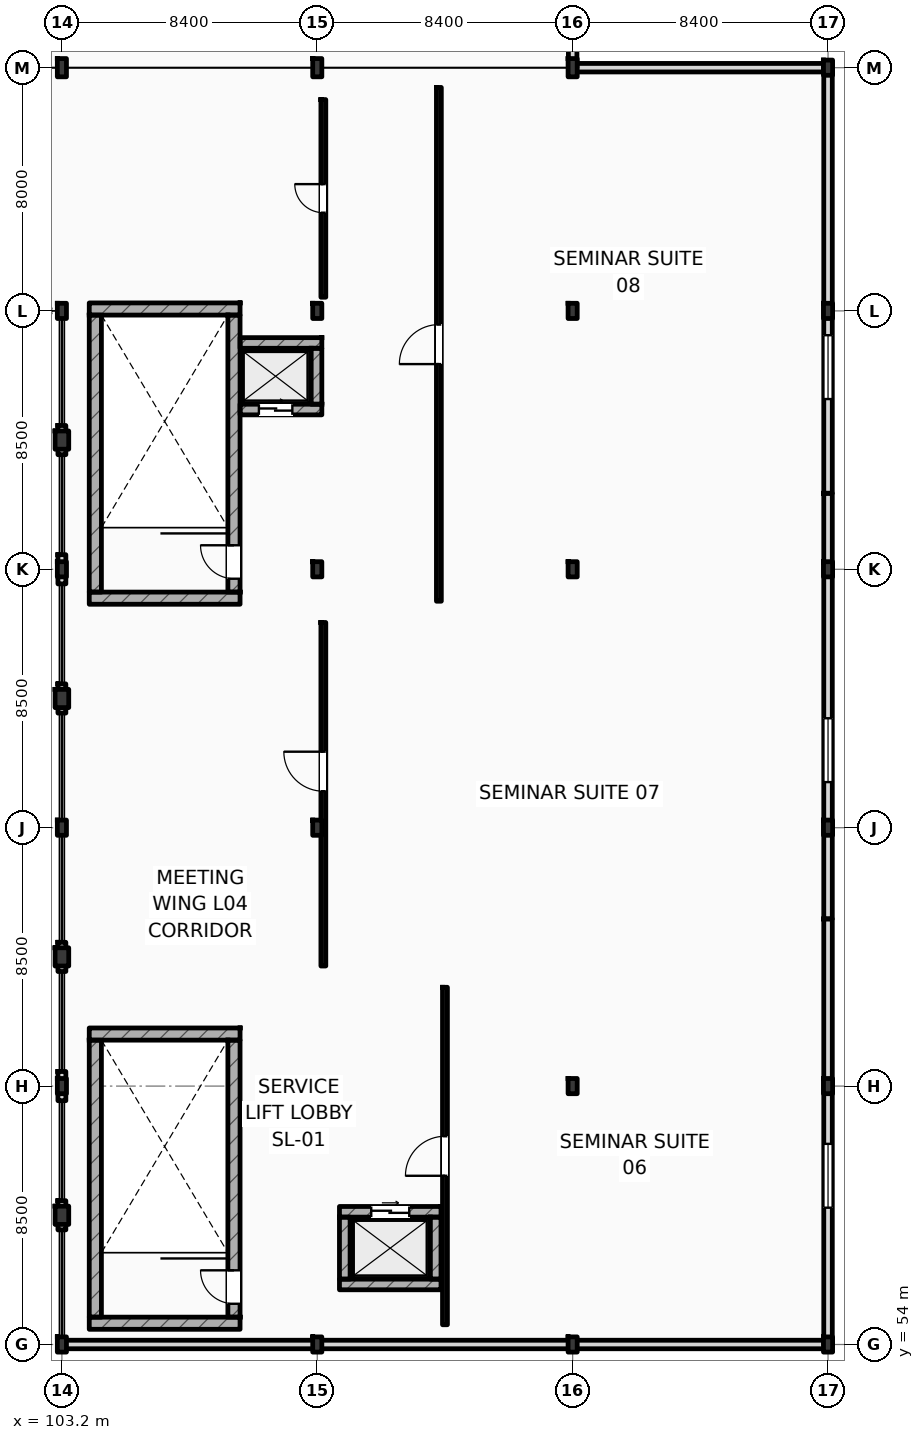
"""IFC4 building model, lengths in metres.
Left out: names, types, materials, properties, quantities, classifications, styles, units other than length and angle.
Written with IfcOpenShell. Run it as: python <this file> out.ifc"""

import sys

from ifc_helpers import new_model, si_unit, direction, frame, frame_2d, origin, origin_2d, place, context, subcontext, project, spatial, rectangle, i_section, extrude, element, fill, save


model = new_model("IFC4")
c1 = context("Model", 3, precision=1e-05, world=origin(), true_north=direction((0.0, 1.0)))
c2 = subcontext(c1, "Body", "Model", "MODEL_VIEW")
j1 = project(units=[si_unit("LENGTHUNIT", "METRE"), si_unit("PLANEANGLEUNIT", "RADIAN")], contexts=[c1])
p1 = place(None, origin())
s1 = spatial("IfcSite", under=j1, at=p1, CompositionType="ELEMENT")
p2 = place(p1, origin())
s2 = spatial("IfcBuilding", under=s1, at=p2, CompositionType="ELEMENT")
p3 = place(p2, frame((0.0, 0.0, 20.4)))
s3 = spatial("IfcBuildingStorey", under=s2, at=p3, CompositionType="ELEMENT", Elevation=20.4)
for number, where, z_axis, x_axis in (
    (1, (103.2, 96.0, 0.0), (0.0, 0.0, 1.0), (1.0, 0.0, 0.0)),
    (2, (111.6, 96.0, 0.0), (0.0, 0.0, 1.0), (1.0, 0.0, 0.0)),
    (3, (120.0, 96.0, 0.0), (0.0, 0.0, 1.0), (1.0, 0.0, 0.0)),
):
    element("IfcColumn", number, at=place(p3, frame(where, z_axis=z_axis, x_axis=x_axis)), inside=s3, PredefinedType="COLUMN", context=c2, shape_type="SweptSolid", body=[
        extrude(i_section(OverallWidth=0.3, OverallDepth=0.6, WebThickness=0.015, FlangeThickness=0.03, FilletRadius=0.027, at=origin_2d()), origin(), (0.0, 0.0, 1.0), 4.2),
    ])
for number, where, z_axis, x_axis in (
    (4, (103.2, 88.0, 0.0), (0.0, 0.0, 1.0), (1.0, 0.0, 0.0)),
    (5, (103.2, 54.0, 0.0), (0.0, 0.0, 1.0), (1.0, 0.0, 0.0)),
    (6, (103.2, 62.5, 0.0), (0.0, 0.0, 1.0), (1.0, 0.0, 0.0)),
    (7, (103.2, 71.0, 0.0), (0.0, 0.0, 1.0), (1.0, 0.0, 0.0)),
    (8, (103.2, 79.5, 0.0), (0.0, 0.0, 1.0), (1.0, 0.0, 0.0)),
    (9, (111.6, 54.0, 0.0), (0.0, 0.0, 1.0), (1.0, 0.0, 0.0)),
    (10, (111.6, 62.5, 0.0), (0.0, 0.0, 1.0), (1.0, 0.0, 0.0)),
    (11, (111.6, 71.0, 0.0), (0.0, 0.0, 1.0), (1.0, 0.0, 0.0)),
    (12, (111.6, 79.5, 0.0), (0.0, 0.0, 1.0), (1.0, 0.0, 0.0)),
    (13, (111.6, 88.0, 0.0), (0.0, 0.0, 1.0), (1.0, 0.0, 0.0)),
    (14, (120.0, 54.0, 0.0), (0.0, 0.0, 1.0), (1.0, 0.0, 0.0)),
    (15, (120.0, 62.5, 0.0), (0.0, 0.0, 1.0), (1.0, 0.0, 0.0)),
    (16, (120.0, 79.5, 0.0), (0.0, 0.0, 1.0), (1.0, 0.0, 0.0)),
    (17, (120.0, 88.0, 0.0), (0.0, 0.0, 1.0), (1.0, 0.0, 0.0)),
    (18, (128.4, 54.0, 0.0), (0.0, 0.0, 1.0), (1.0, 0.0, 0.0)),
    (19, (128.4, 62.5, 0.0), (0.0, 0.0, 1.0), (1.0, 0.0, 0.0)),
    (20, (128.4, 71.0, 0.0), (0.0, 0.0, 1.0), (1.0, 0.0, 0.0)),
    (21, (128.4, 79.5, 0.0), (0.0, 0.0, 1.0), (1.0, 0.0, 0.0)),
    (22, (128.4, 88.0, 0.0), (0.0, 0.0, 1.0), (1.0, 0.0, 0.0)),
    (23, (128.4, 96.0, 0.0), (0.0, 0.0, 1.0), (1.0, 0.0, 0.0)),
):
    element("IfcColumn", number, at=place(p3, frame(where, z_axis=z_axis, x_axis=x_axis)), inside=s3, PredefinedType="COLUMN", context=c2, shape_type="SweptSolid", body=[
        extrude(i_section(OverallWidth=0.3, OverallDepth=0.5, WebThickness=0.014, FlangeThickness=0.028, FilletRadius=0.027, at=origin_2d()), origin(), (0.0, 0.0, 1.0), 4.2),
    ])
for number, where, z_axis, x_axis in (
    (24, (103.2, 58.25, 0.0), (0.0, 0.0, 1.0), (1.0, 0.0, 0.0)),
    (25, (103.2, 66.75, 0.0), (0.0, 0.0, 1.0), (1.0, 0.0, 0.0)),
    (26, (103.2, 75.25, 0.0), (0.0, 0.0, 1.0), (1.0, 0.0, 0.0)),
    (27, (103.2, 83.75, 0.0), (0.0, 0.0, 1.0), (1.0, 0.0, 0.0)),
):
    element("IfcColumn", number, at=place(p3, frame(where, z_axis=z_axis, x_axis=x_axis)), inside=s3, PredefinedType="PILASTER", context=c2, shape_type="SweptSolid", body=[
        extrude(rectangle(XDim=0.45, YDim=0.6, at=origin_2d()), origin(), (0.0, 0.0, 1.0), 4.2),
    ])
for number, where, z_axis, x_axis in (
    (28, (104.1, 88.062, 0.0), (0.0, 0.0, 1.0), (1.0, 0.0, 0.0)),
    (29, (104.1, 78.55, 0.0), (0.0, 0.0, 1.0), (1.0, 0.0, 0.0)),
):
    element("IfcWall", number, at=place(p3, frame(where, z_axis=z_axis, x_axis=x_axis)), inside=s3, PredefinedType="SHEAR", context=c2, shape_type="SweptSolid", body=[
        extrude(rectangle(XDim=4.96, YDim=0.4, at=frame_2d((2.48, 0.0))), origin(), (0.0, 0.0, 1.0), 4.2),
    ])
p4 = place(p3, frame((104.3, 78.75, 0.0), z_axis=(0.0, 0.0, 1.0), x_axis=(0.0, 1.0, 0.0)))
e30 = element("IfcWall", 30, at=p4, inside=s3, PredefinedType="SHEAR", context=c2, shape_type="SweptSolid", body=[
    extrude(rectangle(XDim=9.112, YDim=0.4, at=frame_2d((4.556, 0.0))), origin(), (0.0, 0.0, 1.0), 4.2),
])
p5 = place(p3, frame((108.86, 78.75, 0.0), z_axis=(0.0, 0.0, 1.0), x_axis=(0.0, 1.0, 0.0)))
e31 = element("IfcWall", 31, at=p5, inside=s3, PredefinedType="SHEAR", context=c2, shape_type="SweptSolid", body=[
    extrude(rectangle(XDim=9.112, YDim=0.4, at=frame_2d((4.556, 0.0))), origin(), (0.0, 0.0, 1.0), 4.2),
])
p6 = place(p5, frame((0.44, 0.0, 0.0)))
e32 = element("IfcOpeningElement", 32, at=p6, cuts=e31, PredefinedType="OPENING", context=c2, shape_type="SweptSolid", body=[
    extrude(rectangle(XDim=1.1, YDim=2.2, at=frame_2d((0.55, 1.1))), frame((0.0, 0.21, 0.0), z_axis=(0.0, -1.0, 0.0), x_axis=(1.0, 0.0, 0.0)), (0.0, 0.0, 1.0), 0.42),
])
for number, where, z_axis, x_axis in (
    (33, (104.1, 64.212, 0.0), (0.0, 0.0, 1.0), (1.0, 0.0, 0.0)),
    (34, (104.1, 54.7, 0.0), (0.0, 0.0, 1.0), (1.0, 0.0, 0.0)),
):
    element("IfcWall", number, at=place(p3, frame(where, z_axis=z_axis, x_axis=x_axis)), inside=s3, PredefinedType="SHEAR", context=c2, shape_type="SweptSolid", body=[
        extrude(rectangle(XDim=4.96, YDim=0.4, at=frame_2d((2.48, 0.0))), origin(), (0.0, 0.0, 1.0), 4.2),
    ])
p7 = place(p3, frame((104.3, 54.9, 0.0), z_axis=(0.0, 0.0, 1.0), x_axis=(0.0, 1.0, 0.0)))
e35 = element("IfcWall", 35, at=p7, inside=s3, PredefinedType="SHEAR", context=c2, shape_type="SweptSolid", body=[
    extrude(rectangle(XDim=9.112, YDim=0.4, at=frame_2d((4.556, 0.0))), origin(), (0.0, 0.0, 1.0), 4.2),
])
p8 = place(p3, frame((108.86, 54.9, 0.0), z_axis=(0.0, 0.0, 1.0), x_axis=(0.0, 1.0, 0.0)))
e36 = element("IfcWall", 36, at=p8, inside=s3, PredefinedType="SHEAR", context=c2, shape_type="SweptSolid", body=[
    extrude(rectangle(XDim=9.112, YDim=0.4, at=frame_2d((4.556, 0.0))), origin(), (0.0, 0.0, 1.0), 4.2),
])
p9 = place(p8, frame((0.44, 0.0, 0.0)))
e37 = element("IfcOpeningElement", 37, at=p9, cuts=e36, PredefinedType="OPENING", context=c2, shape_type="SweptSolid", body=[
    extrude(rectangle(XDim=1.1, YDim=2.2, at=frame_2d((0.55, 1.1))), frame((0.0, 0.21, 0.0), z_axis=(0.0, -1.0, 0.0), x_axis=(1.0, 0.0, 0.0)), (0.0, 0.0, 1.0), 0.42),
])
for number, where, z_axis, x_axis in (
    (38, (103.2, 57.77, 0.0), (0.0, 0.0, 1.0), (0.0, 1.0, 0.0)),
    (39, (103.2, 62.02, 0.0), (0.0, 0.0, 1.0), (0.0, 1.0, 0.0)),
    (40, (103.2, 66.27, 0.0), (0.0, 0.0, 1.0), (0.0, 1.0, 0.0)),
    (41, (103.2, 74.77, 0.0), (0.0, 0.0, 1.0), (0.0, 1.0, 0.0)),
    (42, (103.2, 79.02, 0.0), (0.0, 0.0, 1.0), (0.0, 1.0, 0.0)),
    (43, (103.2, 83.27, 0.0), (0.0, 0.0, 1.0), (0.0, 1.0, 0.0)),
):
    element("IfcWall", number, at=place(p3, frame(where, z_axis=z_axis, x_axis=x_axis)), inside=s3, PredefinedType="STANDARD", context=c2, shape_type="SweptSolid", body=[
        extrude(rectangle(XDim=0.96, YDim=0.26, at=frame_2d((0.48, 0.0))), origin(), (0.0, 0.0, 1.0), 3.53),
    ])
p10 = place(p3, frame((103.2, 54.0, 0.0), z_axis=(0.0, 0.0, 1.0), x_axis=(1.0, 0.0, 0.0)))
e44 = element("IfcWall", 44, at=p10, inside=s3, PredefinedType="STANDARD", context=c2, shape_type="SweptSolid", body=[
    extrude(rectangle(XDim=25.2, YDim=0.28, at=frame_2d((12.6, 0.0))), origin(), (0.0, 0.0, 1.0), 3.38),
])
p11 = place(p3, frame((128.4, 54.0, 0.0), z_axis=(0.0, 0.0, 1.0), x_axis=(0.0, 1.0, 0.0)))
e45 = element("IfcWall", 45, at=p11, inside=s3, PredefinedType="STANDARD", context=c2, shape_type="SweptSolid", body=[
    extrude(rectangle(XDim=14.0, YDim=0.28, at=frame_2d((7.0, 0.0))), origin(), (0.0, 0.0, 1.0), 3.53),
])
p12 = place(p11, frame((4.5, 0.0, 1.0)))
e46 = element("IfcOpeningElement", 46, at=p12, cuts=e45, PredefinedType="OPENING", context=c2, shape_type="SweptSolid", body=[
    extrude(rectangle(XDim=2.1, YDim=2.0, at=frame_2d((1.05, 1.0))), frame((0.0, 0.15, 0.0), z_axis=(0.0, -1.0, 0.0), x_axis=(1.0, 0.0, 0.0)), (0.0, 0.0, 1.0), 0.3),
])
p13 = place(p3, frame((128.4, 68.0, 0.0), z_axis=(0.0, 0.0, 1.0), x_axis=(0.0, 1.0, 0.0)))
e47 = element("IfcWall", 47, at=p13, inside=s3, PredefinedType="STANDARD", context=c2, shape_type="SweptSolid", body=[
    extrude(rectangle(XDim=14.0, YDim=0.28, at=frame_2d((7.0, 0.0))), origin(), (0.0, 0.0, 1.0), 3.53),
])
p14 = place(p13, frame((4.5, 0.0, 1.0)))
e48 = element("IfcOpeningElement", 48, at=p14, cuts=e47, PredefinedType="OPENING", context=c2, shape_type="SweptSolid", body=[
    extrude(rectangle(XDim=2.1, YDim=2.0, at=frame_2d((1.05, 1.0))), frame((0.0, 0.15, 0.0), z_axis=(0.0, -1.0, 0.0), x_axis=(1.0, 0.0, 0.0)), (0.0, 0.0, 1.0), 0.3),
])
p15 = place(p3, frame((128.4, 82.0, 0.0), z_axis=(0.0, 0.0, 1.0), x_axis=(0.0, 1.0, 0.0)))
e49 = element("IfcWall", 49, at=p15, inside=s3, PredefinedType="STANDARD", context=c2, shape_type="SweptSolid", body=[
    extrude(rectangle(XDim=14.0, YDim=0.28, at=frame_2d((7.0, 0.0))), origin(), (0.0, 0.0, 1.0), 3.53),
])
p16 = place(p15, frame((3.1, 0.0, 1.0)))
e50 = element("IfcOpeningElement", 50, at=p16, cuts=e49, PredefinedType="OPENING", context=c2, shape_type="SweptSolid", body=[
    extrude(rectangle(XDim=2.1, YDim=2.0, at=frame_2d((1.05, 1.0))), frame((0.0, 0.15, 0.0), z_axis=(0.0, -1.0, 0.0), x_axis=(1.0, 0.0, 0.0)), (0.0, 0.0, 1.0), 0.3),
])
p17 = place(p3, frame((120.0, 96.0, 0.0), z_axis=(0.0, 0.0, 1.0), x_axis=(1.0, 0.0, 0.0)))
e51 = element("IfcWall", 51, at=p17, inside=s3, PredefinedType="STANDARD", context=c2, shape_type="SweptSolid", body=[
    extrude(rectangle(XDim=8.4, YDim=0.28, at=frame_2d((4.2, 0.0))), origin(), (0.0, 0.0, 1.0), 3.38),
])
p18 = place(p3, frame((120.0, 96.0, 0.0), z_axis=(0.0, 0.0, 1.0), x_axis=(0.0, 1.0, 0.0)))
e52 = element("IfcWall", 52, at=p18, inside=s3, PredefinedType="STANDARD", context=c2, shape_type="SweptSolid", body=[
    extrude(rectangle(XDim=22.0, YDim=0.28, at=frame_2d((11.0, 0.0))), origin(), (0.0, 0.0, 1.0), 3.53),
])
p19 = place(p3, frame((109.06, 86.945, 0.0), z_axis=(0.0, 0.0, 1.0), x_axis=(1.0, 0.0, 0.0)))
e53 = element("IfcWall", 53, at=p19, inside=s3, PredefinedType="SHEAR", context=c2, shape_type="SweptSolid", body=[
    extrude(rectangle(XDim=2.69, YDim=0.35, at=frame_2d((1.345, 0.0))), origin(), (0.0, 0.0, 1.0), 3.94),
])
p20 = place(p3, frame((109.06, 84.755, 0.0), z_axis=(0.0, 0.0, 1.0), x_axis=(1.0, 0.0, 0.0)))
e54 = element("IfcWall", 54, at=p20, inside=s3, PredefinedType="SHEAR", context=c2, shape_type="SweptSolid", body=[
    extrude(rectangle(XDim=2.69, YDim=0.35, at=frame_2d((1.345, 0.0))), origin(), (0.0, 0.0, 1.0), 3.94),
])
p21 = place(p20, frame((0.62, 0.0, 0.0)))
e55 = element("IfcOpeningElement", 55, at=p21, cuts=e54, PredefinedType="OPENING", context=c2, shape_type="SweptSolid", body=[
    extrude(rectangle(XDim=1.1, YDim=2.2, at=frame_2d((0.55, 1.1))), frame((0.0, 0.185, 0.0), z_axis=(0.0, -1.0, 0.0), x_axis=(1.0, 0.0, 0.0)), (0.0, 0.0, 1.0), 0.37),
])
p22 = place(p3, frame((111.575, 84.93, 0.0), z_axis=(0.0, 0.0, 1.0), x_axis=(0.0, 1.0, 0.0)))
e56 = element("IfcWall", 56, at=p22, inside=s3, PredefinedType="SHEAR", context=c2, shape_type="SweptSolid", body=[
    extrude(rectangle(XDim=1.84, YDim=0.35, at=frame_2d((0.92, 0.0))), origin(), (0.0, 0.0, 1.0), 3.53),
])
p23 = place(p3, frame((112.33, 58.365, 0.0), z_axis=(0.0, 0.0, 1.0), x_axis=(1.0, 0.0, 0.0)))
e57 = element("IfcWall", 57, at=p23, inside=s3, PredefinedType="SHEAR", context=c2, shape_type="SweptSolid", body=[
    extrude(rectangle(XDim=3.34, YDim=0.35, at=frame_2d((1.67, 0.0))), origin(), (0.0, 0.0, 1.0), 3.94),
])
p24 = place(p23, frame((1.045, 0.0, 0.0)))
e58 = element("IfcOpeningElement", 58, at=p24, cuts=e57, PredefinedType="OPENING", context=c2, shape_type="SweptSolid", body=[
    extrude(rectangle(XDim=1.25, YDim=2.25, at=frame_2d((0.625, 1.125))), frame((0.0, 0.185, 0.0), z_axis=(0.0, -1.0, 0.0), x_axis=(1.0, 0.0, 0.0)), (0.0, 0.0, 1.0), 0.37),
])
p25 = place(p3, frame((112.33, 55.975, 0.0), z_axis=(0.0, 0.0, 1.0), x_axis=(1.0, 0.0, 0.0)))
e59 = element("IfcWall", 59, at=p25, inside=s3, PredefinedType="SHEAR", context=c2, shape_type="SweptSolid", body=[
    extrude(rectangle(XDim=3.34, YDim=0.35, at=frame_2d((1.67, 0.0))), origin(), (0.0, 0.0, 1.0), 3.94),
])
for number, where, z_axis, x_axis in (
    (60, (112.505, 56.15, 0.0), (0.0, 0.0, 1.0), (0.0, 1.0, 0.0)),
    (61, (115.495, 56.15, 0.0), (0.0, 0.0, 1.0), (0.0, 1.0, 0.0)),
):
    element("IfcWall", number, at=place(p3, frame(where, z_axis=z_axis, x_axis=x_axis)), inside=s3, PredefinedType="SHEAR", context=c2, shape_type="SweptSolid", body=[
        extrude(rectangle(XDim=2.04, YDim=0.35, at=frame_2d((1.02, 0.0))), origin(), (0.0, 0.0, 1.0), 3.94),
    ])
p26 = place(p3, frame((115.8, 54.65, 0.0), z_axis=(0.0, 0.0, 1.0), x_axis=(0.0, 1.0, 0.0)))
e62 = element("IfcWall", 62, at=p26, inside=s3, PredefinedType="PARTITIONING", context=c2, shape_type="SweptSolid", body=[
    extrude(rectangle(XDim=11.1, YDim=0.16, at=frame_2d((5.55, 0.0))), origin(), (0.0, 0.0, 1.0), 3.94),
])
p27 = place(p26, frame((4.9, 0.0, 0.0)))
e63 = element("IfcOpeningElement", 63, at=p27, cuts=e62, PredefinedType="OPENING", context=c2, shape_type="SweptSolid", body=[
    extrude(rectangle(XDim=1.3, YDim=2.2, at=frame_2d((0.65, 1.1))), frame((0.0, 0.09, 0.0), z_axis=(0.0, -1.0, 0.0), x_axis=(1.0, 0.0, 0.0)), (0.0, 0.0, 1.0), 0.18),
])
p28 = place(p3, frame((111.8, 66.45, 0.0), z_axis=(0.0, 0.0, 1.0), x_axis=(0.0, 1.0, 0.0)))
e64 = element("IfcWall", 64, at=p28, inside=s3, PredefinedType="PARTITIONING", context=c2, shape_type="SweptSolid", body=[
    extrude(rectangle(XDim=11.3, YDim=0.16, at=frame_2d((5.65, 0.0))), origin(), (0.0, 0.0, 1.0), 3.53),
])
p29 = place(p28, frame((5.75, 0.0, 0.0)))
e65 = element("IfcOpeningElement", 65, at=p29, cuts=e64, PredefinedType="OPENING", context=c2, shape_type="SweptSolid", body=[
    extrude(rectangle(XDim=1.3, YDim=2.2, at=frame_2d((0.65, 1.1))), frame((0.0, 0.09, 0.0), z_axis=(0.0, -1.0, 0.0), x_axis=(1.0, 0.0, 0.0)), (0.0, 0.0, 1.0), 0.18),
])
p30 = place(p3, frame((115.6, 78.45, 0.0), z_axis=(0.0, 0.0, 1.0), x_axis=(0.0, 1.0, 0.0)))
e66 = element("IfcWall", 66, at=p30, inside=s3, PredefinedType="PARTITIONING", context=c2, shape_type="SweptSolid", body=[
    extrude(rectangle(XDim=16.9, YDim=0.16, at=frame_2d((8.45, 0.0))), origin(), (0.0, 0.0, 1.0), 3.94),
])
p31 = place(p30, frame((7.8, 0.0, 0.0)))
e67 = element("IfcOpeningElement", 67, at=p31, cuts=e66, PredefinedType="OPENING", context=c2, shape_type="SweptSolid", body=[
    extrude(rectangle(XDim=1.3, YDim=2.2, at=frame_2d((0.65, 1.1))), frame((0.0, 0.09, 0.0), z_axis=(0.0, -1.0, 0.0), x_axis=(1.0, 0.0, 0.0)), (0.0, 0.0, 1.0), 0.18),
])
p32 = place(p3, frame((111.8, 88.45, 0.0), z_axis=(0.0, 0.0, 1.0), x_axis=(0.0, 1.0, 0.0)))
e68 = element("IfcWall", 68, at=p32, inside=s3, PredefinedType="PARTITIONING", context=c2, shape_type="SweptSolid", body=[
    extrude(rectangle(XDim=6.5, YDim=0.16, at=frame_2d((3.25, 0.0))), origin(), (0.0, 0.0, 1.0), 3.53),
])
p33 = place(p32, frame((2.78, 0.0, 0.0)))
e69 = element("IfcOpeningElement", 69, at=p33, cuts=e68, PredefinedType="OPENING", context=c2, shape_type="SweptSolid", body=[
    extrude(rectangle(XDim=0.94, YDim=2.15, at=frame_2d((0.47, 1.075))), frame((0.0, 0.09, 0.0), z_axis=(0.0, -1.0, 0.0), x_axis=(1.0, 0.0, 0.0)), (0.0, 0.0, 1.0), 0.18),
])
p34 = place(p12, origin())
e70 = element("IfcWindow", 70, at=p34, inside=s3, PartitioningType="DOUBLE_PANEL_VERTICAL", PredefinedType="WINDOW", context=c2, shape_type="SweptSolid", body=[
    extrude(rectangle(XDim=2.1, YDim=2.0, at=frame_2d((1.05, 1.0))), frame((0.0, 0.03, 0.0), z_axis=(0.0, -1.0, 0.0), x_axis=(1.0, 0.0, 0.0)), (0.0, 0.0, 1.0), 0.06),
])
fill(e46, e70)
p35 = place(p14, origin())
e71 = element("IfcWindow", 71, at=p35, inside=s3, PartitioningType="DOUBLE_PANEL_VERTICAL", PredefinedType="WINDOW", context=c2, shape_type="SweptSolid", body=[
    extrude(rectangle(XDim=2.1, YDim=2.0, at=frame_2d((1.05, 1.0))), frame((0.0, 0.03, 0.0), z_axis=(0.0, -1.0, 0.0), x_axis=(1.0, 0.0, 0.0)), (0.0, 0.0, 1.0), 0.06),
])
fill(e48, e71)
p36 = place(p16, origin())
e72 = element("IfcWindow", 72, at=p36, inside=s3, PartitioningType="DOUBLE_PANEL_VERTICAL", PredefinedType="WINDOW", context=c2, shape_type="SweptSolid", body=[
    extrude(rectangle(XDim=2.1, YDim=2.0, at=frame_2d((1.05, 1.0))), frame((0.0, 0.03, 0.0), z_axis=(0.0, -1.0, 0.0), x_axis=(1.0, 0.0, 0.0)), (0.0, 0.0, 1.0), 0.06),
])
fill(e50, e72)
p37 = place(p6, origin())
e73 = element("IfcDoor", 73, at=p37, inside=s3, OperationType="SINGLE_SWING_RIGHT", PredefinedType="DOOR", context=c2, shape_type="SweptSolid", body=[
    extrude(rectangle(XDim=1.1, YDim=2.2, at=frame_2d((0.55, 1.1))), frame((0.0, 0.025, 0.0), z_axis=(0.0, -1.0, 0.0), x_axis=(1.0, 0.0, 0.0)), (0.0, 0.0, 1.0), 0.05),
])
fill(e32, e73)
p38 = place(p9, origin())
e74 = element("IfcDoor", 74, at=p38, inside=s3, OperationType="SINGLE_SWING_RIGHT", PredefinedType="DOOR", context=c2, shape_type="SweptSolid", body=[
    extrude(rectangle(XDim=1.1, YDim=2.2, at=frame_2d((0.55, 1.1))), frame((0.0, 0.025, 0.0), z_axis=(0.0, -1.0, 0.0), x_axis=(1.0, 0.0, 0.0)), (0.0, 0.0, 1.0), 0.05),
])
fill(e37, e74)
p39 = place(p21, origin())
e75 = element("IfcDoor", 75, at=p39, inside=s3, OperationType="SLIDING_TO_LEFT", PredefinedType="DOOR", context=c2, shape_type="SweptSolid", body=[
    extrude(rectangle(XDim=1.1, YDim=2.2, at=frame_2d((0.55, 1.1))), frame((0.0, 0.025, 0.0), z_axis=(0.0, -1.0, 0.0), x_axis=(1.0, 0.0, 0.0)), (0.0, 0.0, 1.0), 0.05),
])
fill(e55, e75)
p40 = place(p24, origin())
e76 = element("IfcDoor", 76, at=p40, inside=s3, OperationType="SLIDING_TO_LEFT", PredefinedType="DOOR", context=c2, shape_type="SweptSolid", body=[
    extrude(rectangle(XDim=1.25, YDim=2.25, at=frame_2d((0.625, 1.125))), frame((0.0, 0.025, 0.0), z_axis=(0.0, -1.0, 0.0), x_axis=(1.0, 0.0, 0.0)), (0.0, 0.0, 1.0), 0.05),
])
fill(e58, e76)
p41 = place(p27, origin())
e77 = element("IfcDoor", 77, at=p41, inside=s3, OperationType="SINGLE_SWING_LEFT", PredefinedType="DOOR", context=c2, shape_type="SweptSolid", body=[
    extrude(rectangle(XDim=1.3, YDim=2.2, at=frame_2d((0.65, 1.1))), frame((0.0, 0.025, 0.0), z_axis=(0.0, -1.0, 0.0), x_axis=(1.0, 0.0, 0.0)), (0.0, 0.0, 1.0), 0.05),
])
fill(e63, e77)
p42 = place(p29, origin())
e78 = element("IfcDoor", 78, at=p42, inside=s3, OperationType="SINGLE_SWING_RIGHT", PredefinedType="DOOR", context=c2, shape_type="SweptSolid", body=[
    extrude(rectangle(XDim=1.3, YDim=2.2, at=frame_2d((0.65, 1.1))), frame((0.0, 0.025, 0.0), z_axis=(0.0, -1.0, 0.0), x_axis=(1.0, 0.0, 0.0)), (0.0, 0.0, 1.0), 0.05),
])
fill(e65, e78)
p43 = place(p31, origin())
e79 = element("IfcDoor", 79, at=p43, inside=s3, OperationType="SINGLE_SWING_LEFT", PredefinedType="DOOR", context=c2, shape_type="SweptSolid", body=[
    extrude(rectangle(XDim=1.3, YDim=2.2, at=frame_2d((0.65, 1.1))), frame((0.0, 0.025, 0.0), z_axis=(0.0, -1.0, 0.0), x_axis=(1.0, 0.0, 0.0)), (0.0, 0.0, 1.0), 0.05),
])
fill(e67, e79)
p44 = place(p33, origin())
e80 = element("IfcDoor", 80, at=p44, inside=s3, OperationType="SINGLE_SWING_RIGHT", PredefinedType="DOOR", context=c2, shape_type="SweptSolid", body=[
    extrude(rectangle(XDim=0.94, YDim=2.15, at=frame_2d((0.47, 1.075))), frame((0.0, 0.025, 0.0), z_axis=(0.0, -1.0, 0.0), x_axis=(1.0, 0.0, 0.0)), (0.0, 0.0, 1.0), 0.05),
])
fill(e69, e80)
save(model, sys.argv[1])
